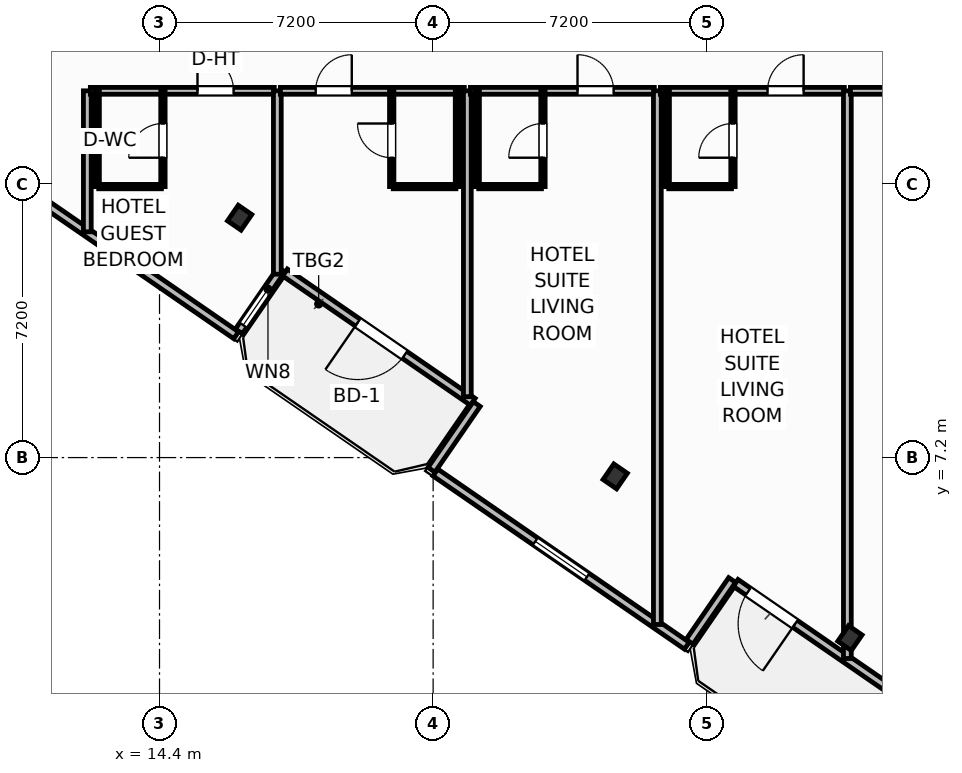
"""IFC4 building model, lengths in metres.
Left out: names, types, materials, properties, quantities, classifications, styles, units other than length and angle.
Written with IfcOpenShell. Run it as: python <this file> out.ifc"""

import sys

from ifc_helpers import new_model, si_unit, direction, frame, frame_2d, origin, origin_2d, place, context, subcontext, project, spatial, rectangle, i_section, extrude, element, fill, save


model = new_model("IFC4")
c1 = context("Model", 3, precision=1e-05, world=origin(), true_north=direction((0.0, 1.0)))
c2 = subcontext(c1, "Body", "Model", "MODEL_VIEW")
j1 = project(units=[si_unit("LENGTHUNIT", "METRE"), si_unit("PLANEANGLEUNIT", "RADIAN")], contexts=[c1])
p1 = place(None, origin())
s1 = spatial("IfcSite", under=j1, at=p1, CompositionType="ELEMENT")
p2 = place(p1, origin())
s2 = spatial("IfcBuilding", under=s1, at=p2, CompositionType="ELEMENT")
p3 = place(p2, frame((0.0, 0.0, 34.4)))
s3 = spatial("IfcBuildingStorey", under=s2, at=p3, CompositionType="ELEMENT", Elevation=34.4)
for number, where, z_axis, x_axis in (
    (1, (16.509, 13.512, 0.0), (0.0, 0.0, 1.0), (0.824, -0.567, 0.0)),
    (2, (26.391, 6.705, 0.0), (0.0, 0.0, 1.0), (0.824, -0.567, 0.0)),
    (3, (32.568, 2.45, 0.0), (0.0, 0.0, 1.0), (0.824, -0.567, 0.0)),
):
    element("IfcColumn", number, at=place(p3, frame(where, z_axis=z_axis, x_axis=x_axis)), inside=s3, PredefinedType="COLUMN", context=c2, shape_type="SweptSolid", body=[
        extrude(i_section(OverallWidth=0.432, OverallDepth=0.498, WebThickness=0.056, FlangeThickness=0.089, FilletRadius=0.025, at=origin_2d()), origin(), (0.0, 0.0, 1.0), 3.7),
    ])
p4 = place(p3, frame((22.643, 8.667, 0.0), z_axis=(0.0, 0.0, 1.0), x_axis=(-0.823534636215, 0.567265989598, 0.0)))
e4 = element("IfcWall", 4, at=p4, inside=s3, PredefinedType="SOLIDWALL", context=c2, shape_type="SweptSolid", body=[
    extrude(rectangle(XDim=6.0, YDim=0.22, at=frame_2d((3.0, 0.0))), origin(), (0.0, 0.0, 1.0), 2.73),
])
p5 = place(p4, frame((2.176, 0.0, 0.0)))
e5 = element("IfcOpeningElement", 5, at=p5, cuts=e4, PredefinedType="OPENING", context=c2, shape_type="SweptSolid", body=[
    extrude(rectangle(XDim=1.5, YDim=2.25, at=frame_2d((0.75, 1.125))), frame((0.0, 0.12, 0.0), z_axis=(0.0, -1.0, 0.0), x_axis=(1.0, 0.0, 0.0)), (0.0, 0.0, 1.0), 0.24),
])
p6 = place(p3, frame((34.502, 0.499, 0.0), z_axis=(0.0, 0.0, 1.0), x_axis=(-0.823534636215, 0.567265989598, 0.0)))
e6 = element("IfcWall", 6, at=p6, inside=s3, PredefinedType="SOLIDWALL", context=c2, shape_type="SweptSolid", body=[
    extrude(rectangle(XDim=6.0, YDim=0.22, at=frame_2d((3.0, 0.0))), origin(), (0.0, 0.0, 1.0), 2.73),
])
p7 = place(p6, frame((4.1, 0.0, 0.0)))
e7 = element("IfcOpeningElement", 7, at=p7, cuts=e6, PredefinedType="OPENING", context=c2, shape_type="SweptSolid", body=[
    extrude(rectangle(XDim=1.5, YDim=2.25, at=frame_2d((0.75, 1.125))), frame((0.0, 0.12, 0.0), z_axis=(0.0, -1.0, 0.0), x_axis=(1.0, 0.0, 0.0)), (0.0, 0.0, 1.0), 0.24),
])
p8 = place(p3, frame((-2.728, 23.605, 0.0), z_axis=(0.0, 0.0, 1.0), x_axis=(0.823535075462, -0.567265351915, 0.0)))
e8 = element("IfcWall", 8, at=p8, inside=s3, PredefinedType="SOLIDWALL", context=c2, shape_type="SweptSolid", body=[
    extrude(rectangle(XDim=23.247, YDim=0.22, at=frame_2d((11.624, 0.0))), origin(), (0.0, 0.0, 1.0), 2.73),
])
p9 = place(p8, frame((10.799, 0.0, 0.8)))
e9 = element("IfcOpeningElement", 9, at=p9, cuts=e8, PredefinedType="OPENING", context=c2, shape_type="SweptSolid", body=[
    extrude(rectangle(XDim=1.65, YDim=1.65, at=frame_2d((0.825, 0.825))), frame((0.0, 0.12, 0.0), z_axis=(0.0, -1.0, 0.0), x_axis=(1.0, 0.0, 0.0)), (0.0, 0.0, 1.0), 0.24),
])
p10 = place(p3, frame((16.488, 10.521, 0.0), z_axis=(0.0, 0.0, 1.0), x_axis=(0.567131976434, 0.823626930902, 0.0)))
e10 = element("IfcWall", 10, at=p10, inside=s3, PredefinedType="SOLIDWALL", context=c2, shape_type="SweptSolid", body=[
    extrude(rectangle(XDim=1.975, YDim=0.22, at=frame_2d((0.988, 0.0))), origin(), (0.0, 0.0, 1.0), 2.73),
])
p11 = place(p10, frame((0.2, 0.0, 0.8)))
e11 = element("IfcOpeningElement", 11, at=p11, cuts=e10, PredefinedType="OPENING", context=c2, shape_type="SweptSolid", body=[
    extrude(rectangle(XDim=1.15, YDim=1.4, at=frame_2d((0.575, 0.7))), frame((0.0, 0.12, 0.0), z_axis=(0.0, -1.0, 0.0), x_axis=(1.0, 0.0, 0.0)), (0.0, 0.0, 1.0), 0.24),
])
p12 = place(p3, frame((22.747, 8.607, 0.0), z_axis=(0.0, 0.0, 1.0), x_axis=(-0.567219383419, -0.823566737474, 0.0)))
e12 = element("IfcWall", 12, at=p12, inside=s3, PredefinedType="SOLIDWALL", context=c2, shape_type="SweptSolid", body=[
    extrude(rectangle(XDim=2.1, YDim=0.22, at=frame_2d((1.05, 0.0))), origin(), (0.0, 0.0, 1.0), 2.73),
])
p13 = place(p3, frame((21.659, 6.807, 0.0), z_axis=(0.0, 0.0, 1.0), x_axis=(0.823535360023, -0.567264938799, 0.0)))
e13 = element("IfcWall", 13, at=p13, inside=s3, PredefinedType="SOLIDWALL", context=c2, shape_type="SweptSolid", body=[
    extrude(rectangle(XDim=8.035, YDim=0.22, at=frame_2d((4.018, 0.0))), origin(), (0.0, 0.0, 1.0), 2.73),
])
p14 = place(p13, frame((3.192, 0.0, 0.8)))
e14 = element("IfcOpeningElement", 14, at=p14, cuts=e13, PredefinedType="OPENING", context=c2, shape_type="SweptSolid", body=[
    extrude(rectangle(XDim=1.65, YDim=1.65, at=frame_2d((0.825, 0.825))), frame((0.0, 0.12, 0.0), z_axis=(0.0, -1.0, 0.0), x_axis=(1.0, 0.0, 0.0)), (0.0, 0.0, 1.0), 0.24),
])
p15 = place(p3, frame((28.347, 2.352, 0.0), z_axis=(0.0, 0.0, 1.0), x_axis=(0.567215821234, 0.823569190865, 0.0)))
e15 = element("IfcWall", 15, at=p15, inside=s3, PredefinedType="SOLIDWALL", context=c2, shape_type="SweptSolid", body=[
    extrude(rectangle(XDim=1.975, YDim=0.22, at=frame_2d((0.988, 0.0))), origin(), (0.0, 0.0, 1.0), 2.73),
])
p16 = place(p3, frame((12.5, 13.14, 0.0), z_axis=(0.0, 0.0, 1.0), x_axis=(0.0, 1.0, 0.0)))
e16 = element("IfcWall", 16, at=p16, inside=s3, PredefinedType="PARTITIONING", context=c2, shape_type="SweptSolid", body=[
    extrude(rectangle(XDim=3.71, YDim=0.205, at=frame_2d((1.855, 0.0))), origin(), (0.0, 0.0, 1.0), 3.45),
])
p17 = place(p3, frame((12.58, 16.85, 0.0), z_axis=(0.0, 0.0, 1.0), x_axis=(1.0, 0.0, 0.0)))
e17 = element("IfcWall", 17, at=p17, inside=s3, PredefinedType="PARTITIONING", context=c2, shape_type="SweptSolid", body=[
    extrude(rectangle(XDim=4.84, YDim=0.18, at=frame_2d((2.42, 0.0))), origin(), (0.0, 0.0, 1.0), 3.45),
])
p18 = place(p17, frame((2.819, 0.0, 0.0)))
e18 = element("IfcOpeningElement", 18, at=p18, cuts=e17, PredefinedType="OPENING", context=c2, shape_type="SweptSolid", body=[
    extrude(rectangle(XDim=0.95, YDim=2.15, at=frame_2d((0.475, 1.075))), frame((0.0, 0.1, 0.0), z_axis=(0.0, -1.0, 0.0), x_axis=(1.0, 0.0, 0.0)), (0.0, 0.0, 1.0), 0.2),
])
p19 = place(p3, frame((12.8, 14.33, 0.0), z_axis=(0.0, 0.0, 1.0), x_axis=(1.0, 0.0, 0.0)))
e19 = element("IfcWall", 19, at=p19, inside=s3, PredefinedType="PARTITIONING", context=c2, shape_type="SweptSolid", body=[
    extrude(rectangle(XDim=1.65, YDim=0.115, at=frame_2d((0.825, 0.0))), origin(), (0.0, 0.0, 1.0), 3.45),
])
p20 = place(p3, frame((14.49, 14.33, 0.0), z_axis=(0.0, 0.0, 1.0), x_axis=(0.0, 1.0, 0.0)))
e20 = element("IfcWall", 20, at=p20, inside=s3, PredefinedType="PARTITIONING", context=c2, shape_type="SweptSolid", body=[
    extrude(rectangle(XDim=2.52, YDim=0.115, at=frame_2d((1.26, 0.0))), origin(), (0.0, 0.0, 1.0), 3.45),
])
p21 = place(p20, frame((0.76, 0.0, 0.0)))
e21 = element("IfcOpeningElement", 21, at=p21, cuts=e20, PredefinedType="OPENING", context=c2, shape_type="SweptSolid", body=[
    extrude(rectangle(XDim=0.9, YDim=2.05, at=frame_2d((0.45, 1.025))), frame((0.0, 0.067, 0.0), z_axis=(0.0, -1.0, 0.0), x_axis=(1.0, 0.0, 0.0)), (0.0, 0.0, 1.0), 0.135),
])
p22 = place(p3, frame((12.76, 14.33, 0.0), z_axis=(0.0, 0.0, 1.0), x_axis=(0.0, 1.0, 0.0)))
e22 = element("IfcWall", 22, at=p22, inside=s3, PredefinedType="PARTITIONING", context=c2, shape_type="SweptSolid", body=[
    extrude(rectangle(XDim=2.52, YDim=0.115, at=frame_2d((1.26, 0.0))), origin(), (0.0, 0.0, 1.0), 3.45),
])
p23 = place(p3, frame((17.5, 12.025, 0.0), z_axis=(0.0, 0.0, 1.0), x_axis=(0.0, 1.0, 0.0)))
e23 = element("IfcWall", 23, at=p23, inside=s3, PredefinedType="PARTITIONING", context=c2, shape_type="SweptSolid", body=[
    extrude(rectangle(XDim=4.825, YDim=0.205, at=frame_2d((2.413, 0.0))), origin(), (0.0, 0.0, 1.0), 3.45),
])
p24 = place(p3, frame((17.58, 16.85, 0.0), z_axis=(0.0, 0.0, 1.0), x_axis=(1.0, 0.0, 0.0)))
e24 = element("IfcWall", 24, at=p24, inside=s3, PredefinedType="PARTITIONING", context=c2, shape_type="SweptSolid", body=[
    extrude(rectangle(XDim=4.84, YDim=0.18, at=frame_2d((2.42, 0.0))), origin(), (0.0, 0.0, 1.0), 3.45),
])
p25 = place(p24, frame((0.929, 0.0, 0.0)))
e25 = element("IfcOpeningElement", 25, at=p25, cuts=e24, PredefinedType="OPENING", context=c2, shape_type="SweptSolid", body=[
    extrude(rectangle(XDim=0.95, YDim=2.15, at=frame_2d((0.475, 1.075))), frame((0.0, 0.1, 0.0), z_axis=(0.0, -1.0, 0.0), x_axis=(1.0, 0.0, 0.0)), (0.0, 0.0, 1.0), 0.2),
])
p26 = place(p3, frame((20.55, 14.33, 0.0), z_axis=(0.0, 0.0, 1.0), x_axis=(1.0, 0.0, 0.0)))
e26 = element("IfcWall", 26, at=p26, inside=s3, PredefinedType="PARTITIONING", context=c2, shape_type="SweptSolid", body=[
    extrude(rectangle(XDim=1.65, YDim=0.115, at=frame_2d((0.825, 0.0))), origin(), (0.0, 0.0, 1.0), 3.45),
])
p27 = place(p3, frame((20.51, 14.33, 0.0), z_axis=(0.0, 0.0, 1.0), x_axis=(0.0, 1.0, 0.0)))
e27 = element("IfcWall", 27, at=p27, inside=s3, PredefinedType="PARTITIONING", context=c2, shape_type="SweptSolid", body=[
    extrude(rectangle(XDim=2.52, YDim=0.115, at=frame_2d((1.26, 0.0))), origin(), (0.0, 0.0, 1.0), 3.45),
])
p28 = place(p27, frame((0.76, 0.0, 0.0)))
e28 = element("IfcOpeningElement", 28, at=p28, cuts=e27, PredefinedType="OPENING", context=c2, shape_type="SweptSolid", body=[
    extrude(rectangle(XDim=0.9, YDim=2.05, at=frame_2d((0.45, 1.025))), frame((0.0, 0.067, 0.0), z_axis=(0.0, -1.0, 0.0), x_axis=(1.0, 0.0, 0.0)), (0.0, 0.0, 1.0), 0.135),
])
p29 = place(p3, frame((22.24, 14.33, 0.0), z_axis=(0.0, 0.0, 1.0), x_axis=(0.0, 1.0, 0.0)))
e29 = element("IfcWall", 29, at=p29, inside=s3, PredefinedType="PARTITIONING", context=c2, shape_type="SweptSolid", body=[
    extrude(rectangle(XDim=2.52, YDim=0.115, at=frame_2d((1.26, 0.0))), origin(), (0.0, 0.0, 1.0), 3.45),
])
p30 = place(p3, frame((22.5, 8.802, 0.0), z_axis=(0.0, 0.0, 1.0), x_axis=(0.0, 1.0, 0.0)))
e30 = element("IfcWall", 30, at=p30, inside=s3, PredefinedType="PARTITIONING", context=c2, shape_type="SweptSolid", body=[
    extrude(rectangle(XDim=8.048, YDim=0.205, at=frame_2d((4.024, 0.0))), origin(), (0.0, 0.0, 1.0), 3.45),
])
p31 = place(p3, frame((22.58, 16.85, 0.0), z_axis=(0.0, 0.0, 1.0), x_axis=(1.0, 0.0, 0.0)))
e31 = element("IfcWall", 31, at=p31, inside=s3, PredefinedType="PARTITIONING", context=c2, shape_type="SweptSolid", body=[
    extrude(rectangle(XDim=4.84, YDim=0.18, at=frame_2d((2.42, 0.0))), origin(), (0.0, 0.0, 1.0), 3.45),
])
p32 = place(p31, frame((2.819, 0.0, 0.0)))
e32 = element("IfcOpeningElement", 32, at=p32, cuts=e31, PredefinedType="OPENING", context=c2, shape_type="SweptSolid", body=[
    extrude(rectangle(XDim=0.95, YDim=2.15, at=frame_2d((0.475, 1.075))), frame((0.0, 0.1, 0.0), z_axis=(0.0, -1.0, 0.0), x_axis=(1.0, 0.0, 0.0)), (0.0, 0.0, 1.0), 0.2),
])
p33 = place(p3, frame((22.8, 14.33, 0.0), z_axis=(0.0, 0.0, 1.0), x_axis=(1.0, 0.0, 0.0)))
e33 = element("IfcWall", 33, at=p33, inside=s3, PredefinedType="PARTITIONING", context=c2, shape_type="SweptSolid", body=[
    extrude(rectangle(XDim=1.65, YDim=0.115, at=frame_2d((0.825, 0.0))), origin(), (0.0, 0.0, 1.0), 3.45),
])
p34 = place(p3, frame((24.49, 14.33, 0.0), z_axis=(0.0, 0.0, 1.0), x_axis=(0.0, 1.0, 0.0)))
e34 = element("IfcWall", 34, at=p34, inside=s3, PredefinedType="PARTITIONING", context=c2, shape_type="SweptSolid", body=[
    extrude(rectangle(XDim=2.52, YDim=0.115, at=frame_2d((1.26, 0.0))), origin(), (0.0, 0.0, 1.0), 3.45),
])
p35 = place(p34, frame((0.76, 0.0, 0.0)))
e35 = element("IfcOpeningElement", 35, at=p35, cuts=e34, PredefinedType="OPENING", context=c2, shape_type="SweptSolid", body=[
    extrude(rectangle(XDim=0.9, YDim=2.05, at=frame_2d((0.45, 1.025))), frame((0.0, 0.067, 0.0), z_axis=(0.0, -1.0, 0.0), x_axis=(1.0, 0.0, 0.0)), (0.0, 0.0, 1.0), 0.135),
])
p36 = place(p3, frame((22.76, 14.33, 0.0), z_axis=(0.0, 0.0, 1.0), x_axis=(0.0, 1.0, 0.0)))
e36 = element("IfcWall", 36, at=p36, inside=s3, PredefinedType="PARTITIONING", context=c2, shape_type="SweptSolid", body=[
    extrude(rectangle(XDim=2.52, YDim=0.115, at=frame_2d((1.26, 0.0))), origin(), (0.0, 0.0, 1.0), 3.45),
])
p37 = place(p3, frame((27.5, 2.808, 0.0), z_axis=(0.0, 0.0, 1.0), x_axis=(0.0, 1.0, 0.0)))
e37 = element("IfcWall", 37, at=p37, inside=s3, PredefinedType="PARTITIONING", context=c2, shape_type="SweptSolid", body=[
    extrude(rectangle(XDim=14.042, YDim=0.205, at=frame_2d((7.021, 0.0))), origin(), (0.0, 0.0, 1.0), 3.45),
])
p38 = place(p3, frame((27.58, 16.85, 0.0), z_axis=(0.0, 0.0, 1.0), x_axis=(1.0, 0.0, 0.0)))
e38 = element("IfcWall", 38, at=p38, inside=s3, PredefinedType="PARTITIONING", context=c2, shape_type="SweptSolid", body=[
    extrude(rectangle(XDim=4.84, YDim=0.18, at=frame_2d((2.42, 0.0))), origin(), (0.0, 0.0, 1.0), 3.45),
])
p39 = place(p38, frame((2.819, 0.0, 0.0)))
e39 = element("IfcOpeningElement", 39, at=p39, cuts=e38, PredefinedType="OPENING", context=c2, shape_type="SweptSolid", body=[
    extrude(rectangle(XDim=0.95, YDim=2.15, at=frame_2d((0.475, 1.075))), frame((0.0, 0.1, 0.0), z_axis=(0.0, -1.0, 0.0), x_axis=(1.0, 0.0, 0.0)), (0.0, 0.0, 1.0), 0.2),
])
p40 = place(p3, frame((27.8, 14.33, 0.0), z_axis=(0.0, 0.0, 1.0), x_axis=(1.0, 0.0, 0.0)))
e40 = element("IfcWall", 40, at=p40, inside=s3, PredefinedType="PARTITIONING", context=c2, shape_type="SweptSolid", body=[
    extrude(rectangle(XDim=1.65, YDim=0.115, at=frame_2d((0.825, 0.0))), origin(), (0.0, 0.0, 1.0), 3.45),
])
p41 = place(p3, frame((29.49, 14.33, 0.0), z_axis=(0.0, 0.0, 1.0), x_axis=(0.0, 1.0, 0.0)))
e41 = element("IfcWall", 41, at=p41, inside=s3, PredefinedType="PARTITIONING", context=c2, shape_type="SweptSolid", body=[
    extrude(rectangle(XDim=2.52, YDim=0.115, at=frame_2d((1.26, 0.0))), origin(), (0.0, 0.0, 1.0), 3.45),
])
p42 = place(p41, frame((0.76, 0.0, 0.0)))
e42 = element("IfcOpeningElement", 42, at=p42, cuts=e41, PredefinedType="OPENING", context=c2, shape_type="SweptSolid", body=[
    extrude(rectangle(XDim=0.9, YDim=2.05, at=frame_2d((0.45, 1.025))), frame((0.0, 0.067, 0.0), z_axis=(0.0, -1.0, 0.0), x_axis=(1.0, 0.0, 0.0)), (0.0, 0.0, 1.0), 0.135),
])
p43 = place(p3, frame((27.76, 14.33, 0.0), z_axis=(0.0, 0.0, 1.0), x_axis=(0.0, 1.0, 0.0)))
e43 = element("IfcWall", 43, at=p43, inside=s3, PredefinedType="PARTITIONING", context=c2, shape_type="SweptSolid", body=[
    extrude(rectangle(XDim=2.52, YDim=0.115, at=frame_2d((1.26, 0.0))), origin(), (0.0, 0.0, 1.0), 3.45),
])
p44 = place(p3, frame((32.5, 1.914, 0.0), z_axis=(0.0, 0.0, 1.0), x_axis=(0.0, 1.0, 0.0)))
e44 = element("IfcWall", 44, at=p44, inside=s3, PredefinedType="PARTITIONING", context=c2, shape_type="SweptSolid", body=[
    extrude(rectangle(XDim=14.936, YDim=0.205, at=frame_2d((7.468, 0.0))), origin(), (0.0, 0.0, 1.0), 2.58),
])
p45 = place(p3, frame((32.58, 16.85, 0.0), z_axis=(0.0, 0.0, 1.0), x_axis=(1.0, 0.0, 0.0)))
e45 = element("IfcWall", 45, at=p45, inside=s3, PredefinedType="PARTITIONING", context=c2, shape_type="SweptSolid", body=[
    extrude(rectangle(XDim=4.84, YDim=0.18, at=frame_2d((2.42, 0.0))), origin(), (0.0, 0.0, 1.0), 3.45),
])
p46 = place(p45, frame((0.929, 0.0, 0.0)))
e46 = element("IfcOpeningElement", 46, at=p46, cuts=e45, PredefinedType="OPENING", context=c2, shape_type="SweptSolid", body=[
    extrude(rectangle(XDim=0.95, YDim=2.15, at=frame_2d((0.475, 1.075))), frame((0.0, 0.1, 0.0), z_axis=(0.0, -1.0, 0.0), x_axis=(1.0, 0.0, 0.0)), (0.0, 0.0, 1.0), 0.2),
])
p47 = place(p5, origin())
e47 = element("IfcDoor", 47, at=p47, inside=s3, OperationType="SINGLE_SWING_RIGHT", PredefinedType="DOOR", context=c2, shape_type="SweptSolid", body=[
    extrude(rectangle(XDim=1.5, YDim=2.25, at=frame_2d((0.75, 1.125))), frame((0.0, 0.025, 0.0), z_axis=(0.0, -1.0, 0.0), x_axis=(1.0, 0.0, 0.0)), (0.0, 0.0, 1.0), 0.05),
])
fill(e5, e47)
p48 = place(p7, origin())
e48 = element("IfcDoor", 48, at=p48, inside=s3, OperationType="SINGLE_SWING_LEFT", PredefinedType="DOOR", context=c2, shape_type="SweptSolid", body=[
    extrude(rectangle(XDim=1.5, YDim=2.25, at=frame_2d((0.75, 1.125))), frame((0.0, 0.025, 0.0), z_axis=(0.0, -1.0, 0.0), x_axis=(1.0, 0.0, 0.0)), (0.0, 0.0, 1.0), 0.05),
])
fill(e7, e48)
p49 = place(p14, origin())
e49 = element("IfcWindow", 49, at=p49, inside=s3, PartitioningType="SINGLE_PANEL", PredefinedType="WINDOW", context=c2, shape_type="SweptSolid", body=[
    extrude(rectangle(XDim=1.65, YDim=1.65, at=frame_2d((0.825, 0.825))), frame((0.0, 0.03, 0.0), z_axis=(0.0, -1.0, 0.0), x_axis=(1.0, 0.0, 0.0)), (0.0, 0.0, 1.0), 0.06),
])
fill(e14, e49)
p50 = place(p18, origin())
e50 = element("IfcDoor", 50, at=p50, inside=s3, OperationType="SINGLE_SWING_LEFT", PredefinedType="DOOR", context=c2, shape_type="SweptSolid", body=[
    extrude(rectangle(XDim=0.95, YDim=2.15, at=frame_2d((0.475, 1.075))), frame((0.0, 0.025, 0.0), z_axis=(0.0, -1.0, 0.0), x_axis=(1.0, 0.0, 0.0)), (0.0, 0.0, 1.0), 0.05),
])
fill(e18, e50)
p51 = place(p21, origin())
e51 = element("IfcDoor", 51, at=p51, inside=s3, OperationType="SINGLE_SWING_LEFT", PredefinedType="DOOR", context=c2, shape_type="SweptSolid", body=[
    extrude(rectangle(XDim=0.9, YDim=2.05, at=frame_2d((0.45, 1.025))), frame((0.0, 0.025, 0.0), z_axis=(0.0, -1.0, 0.0), x_axis=(1.0, 0.0, 0.0)), (0.0, 0.0, 1.0), 0.05),
])
fill(e21, e51)
p52 = place(p25, origin())
e52 = element("IfcDoor", 52, at=p52, inside=s3, OperationType="SINGLE_SWING_RIGHT", PredefinedType="DOOR", context=c2, shape_type="SweptSolid", body=[
    extrude(rectangle(XDim=0.95, YDim=2.15, at=frame_2d((0.475, 1.075))), frame((0.0, 0.025, 0.0), z_axis=(0.0, -1.0, 0.0), x_axis=(1.0, 0.0, 0.0)), (0.0, 0.0, 1.0), 0.05),
])
fill(e25, e52)
p53 = place(p28, origin())
e53 = element("IfcDoor", 53, at=p53, inside=s3, OperationType="SINGLE_SWING_RIGHT", PredefinedType="DOOR", context=c2, shape_type="SweptSolid", body=[
    extrude(rectangle(XDim=0.9, YDim=2.05, at=frame_2d((0.45, 1.025))), frame((0.0, 0.025, 0.0), z_axis=(0.0, -1.0, 0.0), x_axis=(1.0, 0.0, 0.0)), (0.0, 0.0, 1.0), 0.05),
])
fill(e28, e53)
p54 = place(p32, origin())
e54 = element("IfcDoor", 54, at=p54, inside=s3, OperationType="SINGLE_SWING_LEFT", PredefinedType="DOOR", context=c2, shape_type="SweptSolid", body=[
    extrude(rectangle(XDim=0.95, YDim=2.15, at=frame_2d((0.475, 1.075))), frame((0.0, 0.025, 0.0), z_axis=(0.0, -1.0, 0.0), x_axis=(1.0, 0.0, 0.0)), (0.0, 0.0, 1.0), 0.05),
])
fill(e32, e54)
p55 = place(p35, origin())
e55 = element("IfcDoor", 55, at=p55, inside=s3, OperationType="SINGLE_SWING_LEFT", PredefinedType="DOOR", context=c2, shape_type="SweptSolid", body=[
    extrude(rectangle(XDim=0.9, YDim=2.05, at=frame_2d((0.45, 1.025))), frame((0.0, 0.025, 0.0), z_axis=(0.0, -1.0, 0.0), x_axis=(1.0, 0.0, 0.0)), (0.0, 0.0, 1.0), 0.05),
])
fill(e35, e55)
p56 = place(p39, origin())
e56 = element("IfcDoor", 56, at=p56, inside=s3, OperationType="SINGLE_SWING_RIGHT", PredefinedType="DOOR", context=c2, shape_type="SweptSolid", body=[
    extrude(rectangle(XDim=0.95, YDim=2.15, at=frame_2d((0.475, 1.075))), frame((0.0, 0.025, 0.0), z_axis=(0.0, -1.0, 0.0), x_axis=(1.0, 0.0, 0.0)), (0.0, 0.0, 1.0), 0.05),
])
fill(e39, e56)
p57 = place(p42, origin())
e57 = element("IfcDoor", 57, at=p57, inside=s3, OperationType="SINGLE_SWING_LEFT", PredefinedType="DOOR", context=c2, shape_type="SweptSolid", body=[
    extrude(rectangle(XDim=0.9, YDim=2.05, at=frame_2d((0.45, 1.025))), frame((0.0, 0.025, 0.0), z_axis=(0.0, -1.0, 0.0), x_axis=(1.0, 0.0, 0.0)), (0.0, 0.0, 1.0), 0.05),
])
fill(e42, e57)
p58 = place(p11, origin())
e58 = element("IfcWindow", 58, at=p58, inside=s3, PartitioningType="SINGLE_PANEL", PredefinedType="WINDOW", context=c2, shape_type="SweptSolid", body=[
    extrude(rectangle(XDim=1.15, YDim=1.4, at=frame_2d((0.575, 0.7))), frame((0.0, 0.03, 0.0), z_axis=(0.0, -1.0, 0.0), x_axis=(1.0, 0.0, 0.0)), (0.0, 0.0, 1.0), 0.06),
])
fill(e11, e58)
save(model, sys.argv[1])
